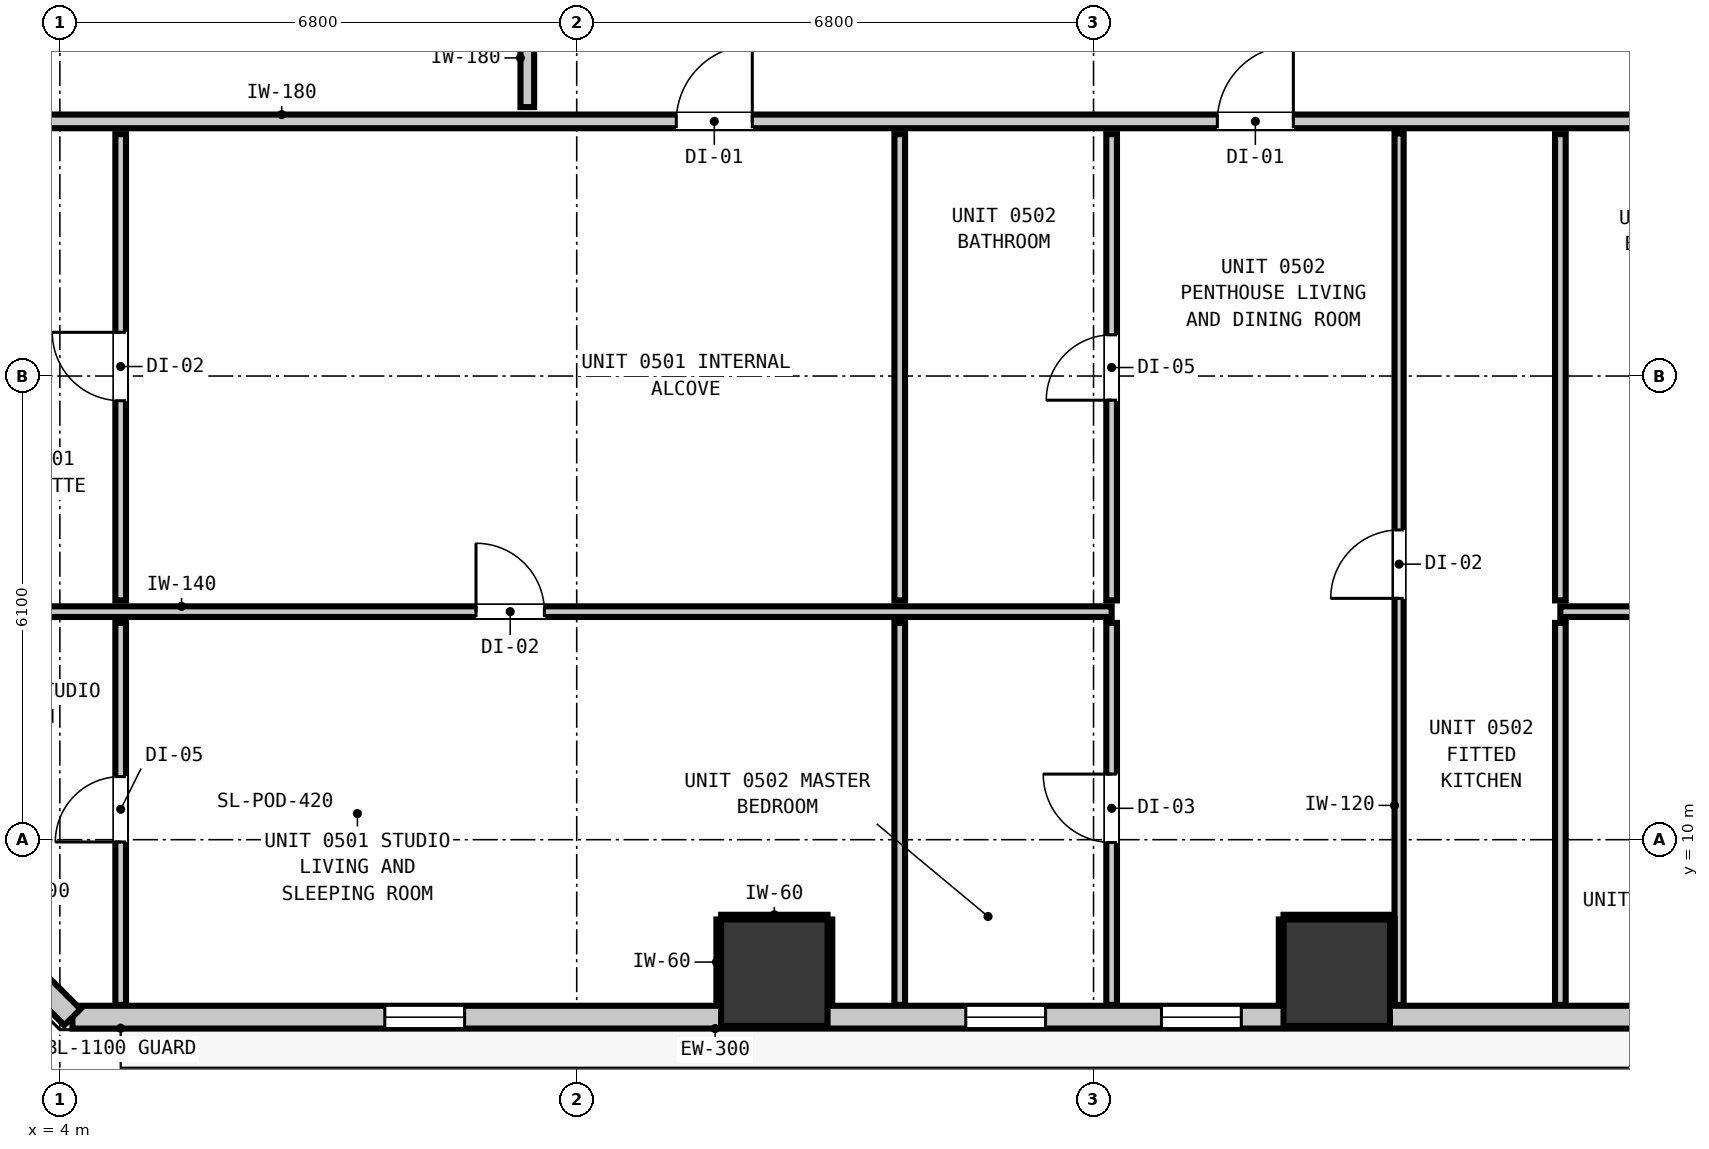
"""IFC4 building model, lengths in metres.
Left out: names, types, materials, properties, quantities, classifications, styles, units other than length and angle.
Written with IfcOpenShell. Run it as: python <this file> out.ifc"""

import sys

from ifc_helpers import new_model, si_unit, direction, frame, frame_2d, origin, origin_2d, place, context, subcontext, project, spatial, rectangle, extrude, element, fill, save


model = new_model("IFC4")
c1 = context("Model", 3, precision=1e-05, world=origin(), true_north=direction((0.0, 1.0)))
c2 = subcontext(c1, "Body", "Model", "MODEL_VIEW")
j1 = project(units=[si_unit("LENGTHUNIT", "METRE"), si_unit("PLANEANGLEUNIT", "RADIAN")], contexts=[c1])
p1 = place(None, origin())
s1 = spatial("IfcSite", under=j1, at=p1, CompositionType="ELEMENT")
p2 = place(p1, origin())
s2 = spatial("IfcBuilding", under=s1, at=p2, CompositionType="ELEMENT")
p3 = place(p2, frame((0.0, 0.0, 22.0)))
s3 = spatial("IfcBuildingStorey", under=s2, at=p3, CompositionType="ELEMENT", Elevation=22.0)
for number, where, z_axis, x_axis in (
    (1, (13.4, 8.25, -0.2), (0.0, 0.0, 1.0), (1.0, 0.0, 0.0)),
    (2, (20.8, 8.25, -0.2), (0.0, 0.0, 1.0), (1.0, 0.0, 0.0)),
):
    element("IfcColumn", number, at=place(p3, frame(where, z_axis=z_axis, x_axis=x_axis)), inside=s3, PredefinedType="COLUMN", context=c2, shape_type="SweptSolid", body=[
        extrude(rectangle(XDim=1.4, YDim=1.4, at=origin_2d()), origin(), (0.0, 0.0, 1.0), 3.52),
    ])
p4 = place(p3, frame((41.635, 7.665, 0.0), z_axis=(0.0, 0.0, 1.0), x_axis=(-1.0, 0.0, 0.0)))
e3 = element("IfcWall", 3, at=p4, inside=s3, PredefinedType="STANDARD", context=c2, shape_type="SweptSolid", body=[
    extrude(rectangle(XDim=37.47, YDim=0.3, at=frame_2d((18.735, 0.0))), origin(), (0.0, 0.0, 1.0), 3.06),
])
p5 = place(p4, frame((1.251, 0.0, 0.0)))
e4 = element("IfcOpeningElement", 4, at=p5, cuts=e3, PredefinedType="OPENING", context=c2, shape_type="SweptSolid", body=[
    extrude(rectangle(XDim=1.0, YDim=2.15, at=frame_2d((0.5, 1.075))), frame((0.0, 0.16, 0.0), z_axis=(0.0, -1.0, 0.0), x_axis=(1.0, 0.0, 0.0)), (0.0, 0.0, 1.0), 0.32),
])
p6 = place(p4, frame((32.31, 0.0, 0.85)))
e5 = element("IfcOpeningElement", 5, at=p6, cuts=e3, PredefinedType="OPENING", context=c2, shape_type="SweptSolid", body=[
    extrude(rectangle(XDim=1.05, YDim=1.65, at=frame_2d((0.525, 0.825))), frame((0.0, 0.16, 0.0), z_axis=(0.0, -1.0, 0.0), x_axis=(1.0, 0.0, 0.0)), (0.0, 0.0, 1.0), 0.32),
])
p7 = place(p4, frame((22.091, 0.0, 0.85)))
e6 = element("IfcOpeningElement", 6, at=p7, cuts=e3, PredefinedType="OPENING", context=c2, shape_type="SweptSolid", body=[
    extrude(rectangle(XDim=1.05, YDim=1.65, at=frame_2d((0.525, 0.825))), frame((0.0, 0.16, 0.0), z_axis=(0.0, -1.0, 0.0), x_axis=(1.0, 0.0, 0.0)), (0.0, 0.0, 1.0), 0.32),
])
p8 = place(p4, frame((24.666, 0.0, 0.85)))
e7 = element("IfcOpeningElement", 7, at=p8, cuts=e3, PredefinedType="OPENING", context=c2, shape_type="SweptSolid", body=[
    extrude(rectangle(XDim=1.05, YDim=1.65, at=frame_2d((0.525, 0.825))), frame((0.0, 0.16, 0.0), z_axis=(0.0, -1.0, 0.0), x_axis=(1.0, 0.0, 0.0)), (0.0, 0.0, 1.0), 0.32),
])
p9 = place(p4, frame((13.434, 0.0, 0.85)))
e8 = element("IfcOpeningElement", 8, at=p9, cuts=e3, PredefinedType="OPENING", context=c2, shape_type="SweptSolid", body=[
    extrude(rectangle(XDim=1.05, YDim=1.65, at=frame_2d((0.525, 0.825))), frame((0.0, 0.16, 0.0), z_axis=(0.0, -1.0, 0.0), x_axis=(1.0, 0.0, 0.0)), (0.0, 0.0, 1.0), 0.32),
])
p10 = place(p4, frame((15.863, 0.0, 0.85)))
e9 = element("IfcOpeningElement", 9, at=p10, cuts=e3, PredefinedType="OPENING", context=c2, shape_type="SweptSolid", body=[
    extrude(rectangle(XDim=1.05, YDim=1.65, at=frame_2d((0.525, 0.825))), frame((0.0, 0.16, 0.0), z_axis=(0.0, -1.0, 0.0), x_axis=(1.0, 0.0, 0.0)), (0.0, 0.0, 1.0), 0.32),
])
p11 = place(p4, frame((6.434, 0.0, 0.85)))
e10 = element("IfcOpeningElement", 10, at=p11, cuts=e3, PredefinedType="OPENING", context=c2, shape_type="SweptSolid", body=[
    extrude(rectangle(XDim=1.05, YDim=1.65, at=frame_2d((0.525, 0.825))), frame((0.0, 0.16, 0.0), z_axis=(0.0, -1.0, 0.0), x_axis=(1.0, 0.0, 0.0)), (0.0, 0.0, 1.0), 0.32),
])
p12 = place(p3, frame((4.165, 7.665, 0.0), z_axis=(0.0, 0.0, 1.0), x_axis=(-0.707106781187, 0.707106781187, 0.0)))
e11 = element("IfcWall", 11, at=p12, inside=s3, PredefinedType="STANDARD", context=c2, shape_type="SweptSolid", body=[
    extrude(rectangle(XDim=3.536, YDim=0.3, at=frame_2d((1.768, 0.0))), origin(), (0.0, 0.0, 1.0), 3.06),
])
p13 = place(p3, frame((1.827, 19.45, 0.0), z_axis=(0.0, 0.0, 1.0), x_axis=(1.0, 0.0, 0.0)))
e12 = element("IfcWall", 12, at=p13, inside=s3, PredefinedType="PARTITIONING", context=c2, shape_type="SweptSolid", body=[
    extrude(rectangle(XDim=42.146, YDim=0.18, at=frame_2d((21.073, 0.0))), origin(), (0.0, 0.0, 1.0), 3.06),
])
p14 = place(p13, frame((10.283, 0.0, 0.0)))
e13 = element("IfcOpeningElement", 13, at=p14, cuts=e12, PredefinedType="OPENING", context=c2, shape_type="SweptSolid", body=[
    extrude(rectangle(XDim=1.0, YDim=2.15, at=frame_2d((0.5, 1.075))), frame((0.0, 0.1, 0.0), z_axis=(0.0, -1.0, 0.0), x_axis=(1.0, 0.0, 0.0)), (0.0, 0.0, 1.0), 0.2),
])
p15 = place(p13, frame((17.402, 0.0, 0.0)))
e14 = element("IfcOpeningElement", 14, at=p15, cuts=e12, PredefinedType="OPENING", context=c2, shape_type="SweptSolid", body=[
    extrude(rectangle(XDim=1.0, YDim=2.15, at=frame_2d((0.5, 1.075))), frame((0.0, 0.1, 0.0), z_axis=(0.0, -1.0, 0.0), x_axis=(1.0, 0.0, 0.0)), (0.0, 0.0, 1.0), 0.2),
])
p16 = place(p13, frame((25.904, 0.0, 0.0)))
e15 = element("IfcOpeningElement", 15, at=p16, cuts=e12, PredefinedType="OPENING", context=c2, shape_type="SweptSolid", body=[
    extrude(rectangle(XDim=1.0, YDim=2.15, at=frame_2d((0.5, 1.075))), frame((0.0, 0.1, 0.0), z_axis=(0.0, -1.0, 0.0), x_axis=(1.0, 0.0, 0.0)), (0.0, 0.0, 1.0), 0.2),
])
p17 = place(p13, frame((34.899, 0.0, 0.0)))
e16 = element("IfcOpeningElement", 16, at=p17, cuts=e12, PredefinedType="OPENING", context=c2, shape_type="SweptSolid", body=[
    extrude(rectangle(XDim=1.0, YDim=2.15, at=frame_2d((0.5, 1.075))), frame((0.0, 0.1, 0.0), z_axis=(0.0, -1.0, 0.0), x_axis=(1.0, 0.0, 0.0)), (0.0, 0.0, 1.0), 0.2),
])
p18 = place(p3, frame((1.827, 13.0, 0.0), z_axis=(0.0, 0.0, 1.0), x_axis=(1.0, 0.0, 0.0)))
e17 = element("IfcWall", 17, at=p18, inside=s3, PredefinedType="PARTITIONING", context=c2, shape_type="SweptSolid", body=[
    extrude(rectangle(XDim=16.011, YDim=0.14, at=frame_2d((8.005, 0.0))), origin(), (0.0, 0.0, 1.0), 3.06),
])
p19 = place(p18, frame((7.648, 0.0, 0.0)))
e18 = element("IfcOpeningElement", 18, at=p19, cuts=e17, PredefinedType="OPENING", context=c2, shape_type="SweptSolid", body=[
    extrude(rectangle(XDim=0.9, YDim=2.1, at=frame_2d((0.45, 1.05))), frame((0.0, 0.08, 0.0), z_axis=(0.0, -1.0, 0.0), x_axis=(1.0, 0.0, 0.0)), (0.0, 0.0, 1.0), 0.16),
])
p20 = place(p3, frame((23.742, 13.0, 0.0), z_axis=(0.0, 0.0, 1.0), x_axis=(1.0, 0.0, 0.0)))
e19 = element("IfcWall", 19, at=p20, inside=s3, PredefinedType="PARTITIONING", context=c2, shape_type="SweptSolid", body=[
    extrude(rectangle(XDim=3.01, YDim=0.14, at=frame_2d((1.505, 0.0))), origin(), (0.0, 0.0, 1.0), 3.06),
])
p21 = place(p3, frame((10.15, 19.638, 0.0), z_axis=(0.0, 0.0, 1.0), x_axis=(0.0, 1.0, 0.0)))
e20 = element("IfcWall", 20, at=p21, inside=s3, PredefinedType="PARTITIONING", context=c2, shape_type="SweptSolid", body=[
    extrude(rectangle(XDim=1.294, YDim=0.18, at=frame_2d((0.647, 0.0))), origin(), (0.0, 0.0, 1.0), 3.06),
])
p22 = place(p3, frame((4.8, 7.827, 0.0), z_axis=(0.0, 0.0, 1.0), x_axis=(0.0, 1.0, 0.0)))
e21 = element("IfcWall", 21, at=p22, inside=s3, PredefinedType="PARTITIONING", context=c2, shape_type="SweptSolid", body=[
    extrude(rectangle(XDim=5.025, YDim=0.14, at=frame_2d((2.513, 0.0))), origin(), (0.0, 0.0, 1.0), 3.06),
])
p23 = place(p22, frame((2.143, 0.0, 0.0)))
e22 = element("IfcOpeningElement", 22, at=p23, cuts=e21, PredefinedType="OPENING", context=c2, shape_type="SweptSolid", body=[
    extrude(rectangle(XDim=0.86, YDim=2.02, at=frame_2d((0.43, 1.01))), frame((0.0, 0.08, 0.0), z_axis=(0.0, -1.0, 0.0), x_axis=(1.0, 0.0, 0.0)), (0.0, 0.0, 1.0), 0.16),
])
p24 = place(p3, frame((4.8, 13.148, 0.0), z_axis=(0.0, 0.0, 1.0), x_axis=(0.0, 1.0, 0.0)))
e23 = element("IfcWall", 23, at=p24, inside=s3, PredefinedType="PARTITIONING", context=c2, shape_type="SweptSolid", body=[
    extrude(rectangle(XDim=6.134, YDim=0.14, at=frame_2d((3.067, 0.0))), origin(), (0.0, 0.0, 1.0), 3.06),
])
p25 = place(p24, frame((2.627, 0.0, 0.0)))
e24 = element("IfcOpeningElement", 24, at=p25, cuts=e23, PredefinedType="OPENING", context=c2, shape_type="SweptSolid", body=[
    extrude(rectangle(XDim=0.9, YDim=2.1, at=frame_2d((0.45, 1.05))), frame((0.0, 0.08, 0.0), z_axis=(0.0, -1.0, 0.0), x_axis=(1.0, 0.0, 0.0)), (0.0, 0.0, 1.0), 0.16),
])
p26 = place(p3, frame((15.05, 7.827, 0.0), z_axis=(0.0, 0.0, 1.0), x_axis=(0.0, 1.0, 0.0)))
e25 = element("IfcWall", 25, at=p26, inside=s3, PredefinedType="PARTITIONING", context=c2, shape_type="SweptSolid", body=[
    extrude(rectangle(XDim=5.025, YDim=0.14, at=frame_2d((2.513, 0.0))), origin(), (0.0, 0.0, 1.0), 3.06),
])
p27 = place(p3, frame((15.05, 13.148, 0.0), z_axis=(0.0, 0.0, 1.0), x_axis=(0.0, 1.0, 0.0)))
e26 = element("IfcWall", 26, at=p27, inside=s3, PredefinedType="PARTITIONING", context=c2, shape_type="SweptSolid", body=[
    extrude(rectangle(XDim=6.134, YDim=0.14, at=frame_2d((3.067, 0.0))), origin(), (0.0, 0.0, 1.0), 3.06),
])
p28 = place(p3, frame((17.838, 7.827, 0.0), z_axis=(0.0, 0.0, 1.0), x_axis=(0.0, 1.0, 0.0)))
e27 = element("IfcWall", 27, at=p28, inside=s3, PredefinedType="PARTITIONING", context=c2, shape_type="SweptSolid", body=[
    extrude(rectangle(XDim=5.025, YDim=0.14, at=frame_2d((2.513, 0.0))), origin(), (0.0, 0.0, 1.0), 3.06),
])
p29 = place(p28, frame((2.136, 0.0, 0.0)))
e28 = element("IfcOpeningElement", 28, at=p29, cuts=e27, PredefinedType="OPENING", context=c2, shape_type="SweptSolid", body=[
    extrude(rectangle(XDim=0.9, YDim=2.1, at=frame_2d((0.45, 1.05))), frame((0.0, 0.08, 0.0), z_axis=(0.0, -1.0, 0.0), x_axis=(1.0, 0.0, 0.0)), (0.0, 0.0, 1.0), 0.16),
])
p30 = place(p3, frame((17.838, 13.148, 0.0), z_axis=(0.0, 0.0, 1.0), x_axis=(0.0, 1.0, 0.0)))
e29 = element("IfcWall", 29, at=p30, inside=s3, PredefinedType="PARTITIONING", context=c2, shape_type="SweptSolid", body=[
    extrude(rectangle(XDim=6.134, YDim=0.14, at=frame_2d((3.067, 0.0))), origin(), (0.0, 0.0, 1.0), 3.06),
])
p31 = place(p30, frame((2.634, 0.0, 0.0)))
e30 = element("IfcOpeningElement", 30, at=p31, cuts=e29, PredefinedType="OPENING", context=c2, shape_type="SweptSolid", body=[
    extrude(rectangle(XDim=0.86, YDim=2.02, at=frame_2d((0.43, 1.01))), frame((0.0, 0.08, 0.0), z_axis=(0.0, -1.0, 0.0), x_axis=(1.0, 0.0, 0.0)), (0.0, 0.0, 1.0), 0.16),
])
p32 = place(p3, frame((23.742, 7.827, 0.0), z_axis=(0.0, 0.0, 1.0), x_axis=(0.0, 1.0, 0.0)))
e31 = element("IfcWall", 31, at=p32, inside=s3, PredefinedType="PARTITIONING", context=c2, shape_type="SweptSolid", body=[
    extrude(rectangle(XDim=5.025, YDim=0.14, at=frame_2d((2.513, 0.0))), origin(), (0.0, 0.0, 1.0), 3.06),
])
p33 = place(p3, frame((23.742, 13.148, 0.0), z_axis=(0.0, 0.0, 1.0), x_axis=(0.0, 1.0, 0.0)))
e32 = element("IfcWall", 32, at=p33, inside=s3, PredefinedType="PARTITIONING", context=c2, shape_type="SweptSolid", body=[
    extrude(rectangle(XDim=6.134, YDim=0.14, at=frame_2d((3.067, 0.0))), origin(), (0.0, 0.0, 1.0), 3.06),
])
p34 = place(p3, frame((21.62, 7.827, 0.0), z_axis=(0.0, 0.0, 1.0), x_axis=(0.0, 1.0, 0.0)))
e33 = element("IfcWall", 33, at=p34, inside=s3, PredefinedType="PARTITIONING", context=c2, shape_type="SweptSolid", body=[
    extrude(rectangle(XDim=11.465, YDim=0.12, at=frame_2d((5.732, 0.0))), origin(), (0.0, 0.0, 1.0), 3.06),
])
p35 = place(p34, frame((5.348, 0.0, 0.0)))
e34 = element("IfcOpeningElement", 34, at=p35, cuts=e33, PredefinedType="OPENING", context=c2, shape_type="SweptSolid", body=[
    extrude(rectangle(XDim=0.9, YDim=2.1, at=frame_2d((0.45, 1.05))), frame((0.0, 0.07, 0.0), z_axis=(0.0, -1.0, 0.0), x_axis=(1.0, 0.0, 0.0)), (0.0, 0.0, 1.0), 0.14),
])
p36 = place(p3, frame((12.7, 8.982, 0.0), z_axis=(0.0, 0.0, 1.0), x_axis=(1.0, 0.0, 0.0)))
e35 = element("IfcWall", 35, at=p36, inside=s3, PredefinedType="PARTITIONING", context=c2, shape_type="SweptSolid", body=[
    extrude(rectangle(XDim=1.4, YDim=0.06, at=frame_2d((0.7, 0.0))), origin(), (0.0, 0.0, 1.0), 1.45),
])
for number, where, z_axis, x_axis in (
    (36, (12.668, 7.83, 0.0), (0.0, 0.0, 1.0), (0.0, 1.0, 0.0)),
    (37, (14.132, 7.83, 0.0), (0.0, 0.0, 1.0), (0.0, 1.0, 0.0)),
):
    element("IfcWall", number, at=place(p3, frame(where, z_axis=z_axis, x_axis=x_axis)), inside=s3, PredefinedType="PARTITIONING", context=c2, shape_type="SweptSolid", body=[
        extrude(rectangle(XDim=1.12, YDim=0.06, at=frame_2d((0.56, 0.0))), origin(), (0.0, 0.0, 1.0), 1.45),
    ])
p37 = place(p3, frame((20.1, 8.982, 0.0), z_axis=(0.0, 0.0, 1.0), x_axis=(1.0, 0.0, 0.0)))
e38 = element("IfcWall", 38, at=p37, inside=s3, PredefinedType="PARTITIONING", context=c2, shape_type="SweptSolid", body=[
    extrude(rectangle(XDim=1.4, YDim=0.06, at=frame_2d((0.7, 0.0))), origin(), (0.0, 0.0, 1.0), 1.45),
])
for number, where, z_axis, x_axis in (
    (39, (20.068, 7.83, 0.0), (0.0, 0.0, 1.0), (0.0, 1.0, 0.0)),
    (40, (21.532, 7.83, 0.0), (0.0, 0.0, 1.0), (0.0, 1.0, 0.0)),
):
    element("IfcWall", number, at=place(p3, frame(where, z_axis=z_axis, x_axis=x_axis)), inside=s3, PredefinedType="PARTITIONING", context=c2, shape_type="SweptSolid", body=[
        extrude(rectangle(XDim=1.12, YDim=0.06, at=frame_2d((0.56, 0.0))), origin(), (0.0, 0.0, 1.0), 1.45),
    ])
p38 = place(p6, origin())
e41 = element("IfcWindow", 41, at=p38, inside=s3, PartitioningType="SINGLE_PANEL", PredefinedType="WINDOW", context=c2, shape_type="SweptSolid", body=[
    extrude(rectangle(XDim=1.05, YDim=1.65, at=frame_2d((0.525, 0.825))), frame((0.0, 0.03, 0.0), z_axis=(0.0, -1.0, 0.0), x_axis=(1.0, 0.0, 0.0)), (0.0, 0.0, 1.0), 0.06),
])
fill(e5, e41)
p39 = place(p7, origin())
e42 = element("IfcWindow", 42, at=p39, inside=s3, PartitioningType="SINGLE_PANEL", PredefinedType="WINDOW", context=c2, shape_type="SweptSolid", body=[
    extrude(rectangle(XDim=1.05, YDim=1.65, at=frame_2d((0.525, 0.825))), frame((0.0, 0.03, 0.0), z_axis=(0.0, -1.0, 0.0), x_axis=(1.0, 0.0, 0.0)), (0.0, 0.0, 1.0), 0.06),
])
fill(e6, e42)
p40 = place(p8, origin())
e43 = element("IfcWindow", 43, at=p40, inside=s3, PartitioningType="SINGLE_PANEL", PredefinedType="WINDOW", context=c2, shape_type="SweptSolid", body=[
    extrude(rectangle(XDim=1.05, YDim=1.65, at=frame_2d((0.525, 0.825))), frame((0.0, 0.03, 0.0), z_axis=(0.0, -1.0, 0.0), x_axis=(1.0, 0.0, 0.0)), (0.0, 0.0, 1.0), 0.06),
])
fill(e7, e43)
p41 = place(p14, origin())
e44 = element("IfcDoor", 44, at=p41, inside=s3, OperationType="SINGLE_SWING_RIGHT", PredefinedType="DOOR", context=c2, shape_type="SweptSolid", body=[
    extrude(rectangle(XDim=1.0, YDim=2.15, at=frame_2d((0.5, 1.075))), frame((0.0, 0.025, 0.0), z_axis=(0.0, -1.0, 0.0), x_axis=(1.0, 0.0, 0.0)), (0.0, 0.0, 1.0), 0.05),
])
fill(e13, e44)
p42 = place(p19, origin())
e45 = element("IfcDoor", 45, at=p42, inside=s3, OperationType="SINGLE_SWING_LEFT", PredefinedType="DOOR", context=c2, shape_type="SweptSolid", body=[
    extrude(rectangle(XDim=0.9, YDim=2.1, at=frame_2d((0.45, 1.05))), frame((0.0, 0.025, 0.0), z_axis=(0.0, -1.0, 0.0), x_axis=(1.0, 0.0, 0.0)), (0.0, 0.0, 1.0), 0.05),
])
fill(e18, e45)
p43 = place(p25, origin())
e46 = element("IfcDoor", 46, at=p43, inside=s3, OperationType="SINGLE_SWING_RIGHT", PredefinedType="DOOR", context=c2, shape_type="SweptSolid", body=[
    extrude(rectangle(XDim=0.9, YDim=2.1, at=frame_2d((0.45, 1.05))), frame((0.0, 0.025, 0.0), z_axis=(0.0, -1.0, 0.0), x_axis=(1.0, 0.0, 0.0)), (0.0, 0.0, 1.0), 0.05),
])
fill(e24, e46)
p44 = place(p23, origin())
e47 = element("IfcDoor", 47, at=p44, inside=s3, OperationType="SINGLE_SWING_LEFT", PredefinedType="DOOR", context=c2, shape_type="SweptSolid", body=[
    extrude(rectangle(XDim=0.86, YDim=2.02, at=frame_2d((0.43, 1.01))), frame((0.0, 0.025, 0.0), z_axis=(0.0, -1.0, 0.0), x_axis=(1.0, 0.0, 0.0)), (0.0, 0.0, 1.0), 0.05),
])
fill(e22, e47)
p45 = place(p15, origin())
e48 = element("IfcDoor", 48, at=p45, inside=s3, OperationType="SINGLE_SWING_RIGHT", PredefinedType="DOOR", context=c2, shape_type="SweptSolid", body=[
    extrude(rectangle(XDim=1.0, YDim=2.15, at=frame_2d((0.5, 1.075))), frame((0.0, 0.025, 0.0), z_axis=(0.0, -1.0, 0.0), x_axis=(1.0, 0.0, 0.0)), (0.0, 0.0, 1.0), 0.05),
])
fill(e14, e48)
p46 = place(p31, origin())
e49 = element("IfcDoor", 49, at=p46, inside=s3, OperationType="SINGLE_SWING_LEFT", PredefinedType="DOOR", context=c2, shape_type="SweptSolid", body=[
    extrude(rectangle(XDim=0.86, YDim=2.02, at=frame_2d((0.43, 1.01))), frame((0.0, 0.025, 0.0), z_axis=(0.0, -1.0, 0.0), x_axis=(1.0, 0.0, 0.0)), (0.0, 0.0, 1.0), 0.05),
])
fill(e30, e49)
p47 = place(p29, origin())
e50 = element("IfcDoor", 50, at=p47, inside=s3, OperationType="SINGLE_SWING_RIGHT", PredefinedType="DOOR", context=c2, shape_type="SweptSolid", body=[
    extrude(rectangle(XDim=0.9, YDim=2.1, at=frame_2d((0.45, 1.05))), frame((0.0, 0.025, 0.0), z_axis=(0.0, -1.0, 0.0), x_axis=(1.0, 0.0, 0.0)), (0.0, 0.0, 1.0), 0.05),
])
fill(e28, e50)
p48 = place(p35, origin())
e51 = element("IfcDoor", 51, at=p48, inside=s3, OperationType="SINGLE_SWING_LEFT", PredefinedType="DOOR", context=c2, shape_type="SweptSolid", body=[
    extrude(rectangle(XDim=0.9, YDim=2.1, at=frame_2d((0.45, 1.05))), frame((0.0, 0.025, 0.0), z_axis=(0.0, -1.0, 0.0), x_axis=(1.0, 0.0, 0.0)), (0.0, 0.0, 1.0), 0.05),
])
fill(e34, e51)
save(model, sys.argv[1])
